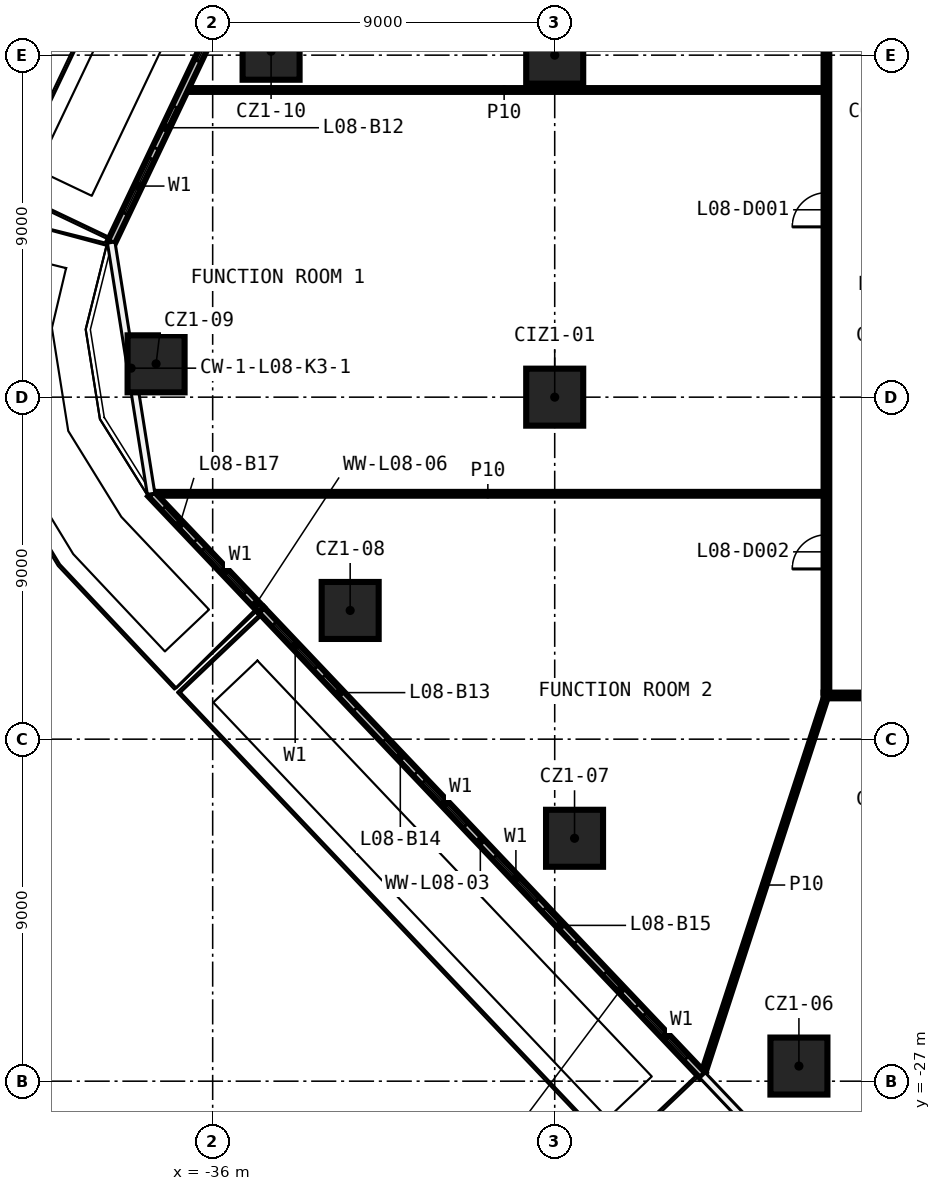
"""IFC4 building model, lengths in metres.
Left out: names, types, materials, properties, quantities, classifications, styles, units other than length and angle.
Written with IfcOpenShell. Run it as: python <this file> out.ifc"""

import sys

from ifc_helpers import new_model, si_unit, direction, frame, frame_2d, origin, origin_2d, place, context, subcontext, project, spatial, rectangle, extrude, element, fill, save


model = new_model("IFC4")
c1 = context("Model", 3, precision=1e-05, world=origin(), true_north=direction((0.0, 1.0)))
c2 = subcontext(c1, "Body", "Model", "MODEL_VIEW")
j1 = project(units=[si_unit("LENGTHUNIT", "METRE"), si_unit("PLANEANGLEUNIT", "RADIAN")], contexts=[c1])
p1 = place(None, origin())
s1 = spatial("IfcSite", under=j1, at=p1, CompositionType="ELEMENT")
p2 = place(p1, origin())
s2 = spatial("IfcBuilding", under=s1, at=p2, CompositionType="ELEMENT")
p3 = place(p2, frame((0.0, 0.0, 51.4)))
s3 = spatial("IfcBuildingStorey", under=s2, at=p3, CompositionType="ELEMENT", Elevation=51.4)
for number, where, z_axis, x_axis in (
    (1, (-20.574, -26.602, 0.0), (0.0, 0.0, 1.0), (1.0, 0.0, 0.0)),
    (2, (-26.478, -20.608, 0.0), (0.0, 0.0, 1.0), (1.0, 0.0, 0.0)),
    (3, (-32.382, -14.613, 0.0), (0.0, 0.0, 1.0), (1.0, 0.0, 0.0)),
    (4, (-37.489, -8.123, 0.0), (0.0, 0.0, 1.0), (1.0, 0.0, 0.0)),
    (5, (-34.463, 0.103, 0.0), (0.0, 0.0, 1.0), (1.0, 0.0, 0.0)),
    (6, (-27.0, -9.0, 0.0), (0.0, 0.0, 1.0), (1.0, 0.0, 0.0)),
    (7, (-27.0, 0.0, 0.0), (0.0, 0.0, 1.0), (1.0, 0.0, 0.0)),
):
    element("IfcColumn", number, at=place(p3, frame(where, z_axis=z_axis, x_axis=x_axis)), inside=s3, PredefinedType="COLUMN", context=c2, shape_type="SweptSolid", body=[
        extrude(rectangle(XDim=1.5, YDim=1.5, at=origin_2d()), origin(), (0.0, 0.0, 1.0), 3.3),
    ])
p4 = place(p3, frame((19.925, -16.85, 0.0), z_axis=(0.0, 0.0, 1.0), x_axis=(-1.0, 0.0, 0.0)))
e8 = element("IfcWall", 8, at=p4, inside=s3, PredefinedType="PARTITIONING", context=c2, shape_type="SweptSolid", body=[
    extrude(rectangle(XDim=39.85, YDim=0.15, at=frame_2d((19.925, 0.0))), origin(), (0.0, 0.0, 1.0), 3.3),
])
p5 = place(p4, frame((31.008, 0.0, 0.0)))
e9 = element("IfcOpeningElement", 9, at=p5, cuts=e8, PredefinedType="OPENING", context=c2, shape_type="SweptSolid", body=[
    extrude(rectangle(XDim=0.9, YDim=2.1, at=frame_2d((0.45, 1.05))), frame((0.0, 0.085, 0.0), z_axis=(0.0, -1.0, 0.0), x_axis=(1.0, 0.0, 0.0)), (0.0, 0.0, 1.0), 0.17),
])
p6 = place(p4, frame((22.704, 0.0, 0.0)))
e10 = element("IfcOpeningElement", 10, at=p6, cuts=e8, PredefinedType="OPENING", context=c2, shape_type="SweptSolid", body=[
    extrude(rectangle(XDim=0.9, YDim=2.1, at=frame_2d((0.45, 1.05))), frame((0.0, 0.085, 0.0), z_axis=(0.0, -1.0, 0.0), x_axis=(1.0, 0.0, 0.0)), (0.0, 0.0, 1.0), 0.17),
])
p7 = place(p4, frame((3.888, 0.0, 0.0)))
e11 = element("IfcOpeningElement", 11, at=p7, cuts=e8, PredefinedType="OPENING", context=c2, shape_type="SweptSolid", body=[
    extrude(rectangle(XDim=0.9, YDim=2.1, at=frame_2d((0.45, 1.05))), frame((0.0, 0.085, 0.0), z_axis=(0.0, -1.0, 0.0), x_axis=(1.0, 0.0, 0.0)), (0.0, 0.0, 1.0), 0.17),
])
p8 = place(p3, frame((-37.594, -11.543, 0.0), z_axis=(0.0, 0.0, 1.0), x_axis=(1.0, 0.0, 0.0)))
e12 = element("IfcWall", 12, at=p8, inside=s3, PredefinedType="PARTITIONING", context=c2, shape_type="SweptSolid", body=[
    extrude(rectangle(XDim=17.668, YDim=0.1, at=frame_2d((8.834, 0.0))), origin(), (0.0, 0.0, 1.0), 3.3),
])
p9 = place(p3, frame((-36.737, -0.917, 0.0), z_axis=(0.0, 0.0, 1.0), x_axis=(1.0, 0.0, 0.0)))
e13 = element("IfcWall", 13, at=p9, inside=s3, PredefinedType="PARTITIONING", context=c2, shape_type="SweptSolid", body=[
    extrude(rectangle(XDim=16.812, YDim=0.1, at=frame_2d((8.406, 0.0))), origin(), (0.0, 0.0, 1.0), 3.3),
])
p10 = place(p3, frame((-23.101, -26.826, 0.0), z_axis=(0.0, 0.0, 1.0), x_axis=(0.309854630824, 0.950783943784, 0.0)))
e14 = element("IfcWall", 14, at=p10, inside=s3, PredefinedType="PARTITIONING", context=c2, shape_type="SweptSolid", body=[
    extrude(rectangle(XDim=10.493, YDim=0.1, at=frame_2d((5.246, 0.0))), origin(), (0.0, 0.0, 1.0), 3.3),
])
p11 = place(p3, frame((-19.85, -16.775, 0.0), z_axis=(0.0, 0.0, 1.0), x_axis=(0.0, 1.0, 0.0)))
e15 = element("IfcWall", 15, at=p11, inside=s3, PredefinedType="PARTITIONING", context=c2, shape_type="SweptSolid", body=[
    extrude(rectangle(XDim=33.55, YDim=0.15, at=frame_2d((16.775, 0.0))), origin(), (0.0, 0.0, 1.0), 3.3),
])
p12 = place(p11, frame((12.256, 0.0, 0.0)))
e16 = element("IfcOpeningElement", 16, at=p12, cuts=e15, PredefinedType="OPENING", context=c2, shape_type="SweptSolid", body=[
    extrude(rectangle(XDim=0.9, YDim=2.1, at=frame_2d((0.45, 1.05))), frame((0.0, 0.085, 0.0), z_axis=(0.0, -1.0, 0.0), x_axis=(1.0, 0.0, 0.0)), (0.0, 0.0, 1.0), 0.17),
])
p13 = place(p11, frame((3.254, 0.0, 0.0)))
e17 = element("IfcOpeningElement", 17, at=p13, cuts=e15, PredefinedType="OPENING", context=c2, shape_type="SweptSolid", body=[
    extrude(rectangle(XDim=0.9, YDim=2.1, at=frame_2d((0.45, 1.05))), frame((0.0, 0.085, 0.0), z_axis=(0.0, -1.0, 0.0), x_axis=(1.0, 0.0, 0.0)), (0.0, 0.0, 1.0), 0.17),
])
p14 = place(p11, frame((27.451, 0.0, 0.0)))
e18 = element("IfcOpeningElement", 18, at=p14, cuts=e15, PredefinedType="OPENING", context=c2, shape_type="SweptSolid", body=[
    extrude(rectangle(XDim=0.9, YDim=2.1, at=frame_2d((0.45, 1.05))), frame((0.0, 0.085, 0.0), z_axis=(0.0, -1.0, 0.0), x_axis=(1.0, 0.0, 0.0)), (0.0, 0.0, 1.0), 0.17),
])
p15 = place(p3, frame((-25.295, 23.168, 0.0), z_axis=(0.0, 0.0, 1.0), x_axis=(-0.429791665344, -0.902928083737, 0.0)))
e19 = element("IfcWall", 19, at=p15, inside=s3, PredefinedType="SOLIDWALL", context=c2, shape_type="SweptSolid", body=[
    extrude(rectangle(XDim=31.12, YDim=0.2, at=frame_2d((15.56, 0.0))), origin(), (0.0, 0.0, 1.0), 3.3),
])
p16 = place(p15, frame((2.0, 0.0, 0.6)))
e20 = element("IfcOpeningElement", 20, at=p16, cuts=e19, PredefinedType="OPENING", context=c2, shape_type="SweptSolid", body=[
    extrude(rectangle(XDim=1.6, YDim=2.4, at=frame_2d((0.8, 1.2))), frame((0.0, 0.11, 0.0), z_axis=(0.0, -1.0, 0.0), x_axis=(1.0, 0.0, 0.0)), (0.0, 0.0, 1.0), 0.22),
])
p17 = place(p15, frame((0.5, 0.0, 0.0)))
e21 = element("IfcOpeningElement", 21, at=p17, cuts=e19, PredefinedType="OPENING", context=c2, shape_type="SweptSolid", body=[
    extrude(rectangle(XDim=1.2, YDim=2.4, at=frame_2d((0.6, 1.2))), frame((0.0, 0.11, 0.0), z_axis=(0.0, -1.0, 0.0), x_axis=(1.0, 0.0, 0.0)), (0.0, 0.0, 1.0), 0.22),
])
p18 = place(p15, frame((6.446, 0.0, 0.6)))
e22 = element("IfcOpeningElement", 22, at=p18, cuts=e19, PredefinedType="OPENING", context=c2, shape_type="SweptSolid", body=[
    extrude(rectangle(XDim=1.6, YDim=2.4, at=frame_2d((0.8, 1.2))), frame((0.0, 0.11, 0.0), z_axis=(0.0, -1.0, 0.0), x_axis=(1.0, 0.0, 0.0)), (0.0, 0.0, 1.0), 0.22),
])
p19 = place(p15, frame((4.946, 0.0, 0.0)))
e23 = element("IfcOpeningElement", 23, at=p19, cuts=e19, PredefinedType="OPENING", context=c2, shape_type="SweptSolid", body=[
    extrude(rectangle(XDim=1.2, YDim=2.4, at=frame_2d((0.6, 1.2))), frame((0.0, 0.11, 0.0), z_axis=(0.0, -1.0, 0.0), x_axis=(1.0, 0.0, 0.0)), (0.0, 0.0, 1.0), 0.22),
])
p20 = place(p15, frame((10.891, 0.0, 0.6)))
e24 = element("IfcOpeningElement", 24, at=p20, cuts=e19, PredefinedType="OPENING", context=c2, shape_type="SweptSolid", body=[
    extrude(rectangle(XDim=1.6, YDim=2.4, at=frame_2d((0.8, 1.2))), frame((0.0, 0.11, 0.0), z_axis=(0.0, -1.0, 0.0), x_axis=(1.0, 0.0, 0.0)), (0.0, 0.0, 1.0), 0.22),
])
p21 = place(p15, frame((9.391, 0.0, 0.0)))
e25 = element("IfcOpeningElement", 25, at=p21, cuts=e19, PredefinedType="OPENING", context=c2, shape_type="SweptSolid", body=[
    extrude(rectangle(XDim=1.2, YDim=2.4, at=frame_2d((0.6, 1.2))), frame((0.0, 0.11, 0.0), z_axis=(0.0, -1.0, 0.0), x_axis=(1.0, 0.0, 0.0)), (0.0, 0.0, 1.0), 0.22),
])
p22 = place(p15, frame((15.337, 0.0, 0.6)))
e26 = element("IfcOpeningElement", 26, at=p22, cuts=e19, PredefinedType="OPENING", context=c2, shape_type="SweptSolid", body=[
    extrude(rectangle(XDim=1.6, YDim=2.4, at=frame_2d((0.8, 1.2))), frame((0.0, 0.11, 0.0), z_axis=(0.0, -1.0, 0.0), x_axis=(1.0, 0.0, 0.0)), (0.0, 0.0, 1.0), 0.22),
])
p23 = place(p15, frame((13.837, 0.0, 0.0)))
e27 = element("IfcOpeningElement", 27, at=p23, cuts=e19, PredefinedType="OPENING", context=c2, shape_type="SweptSolid", body=[
    extrude(rectangle(XDim=1.2, YDim=2.4, at=frame_2d((0.6, 1.2))), frame((0.0, 0.11, 0.0), z_axis=(0.0, -1.0, 0.0), x_axis=(1.0, 0.0, 0.0)), (0.0, 0.0, 1.0), 0.22),
])
p24 = place(p15, frame((19.783, 0.0, 0.6)))
e28 = element("IfcOpeningElement", 28, at=p24, cuts=e19, PredefinedType="OPENING", context=c2, shape_type="SweptSolid", body=[
    extrude(rectangle(XDim=1.6, YDim=2.4, at=frame_2d((0.8, 1.2))), frame((0.0, 0.11, 0.0), z_axis=(0.0, -1.0, 0.0), x_axis=(1.0, 0.0, 0.0)), (0.0, 0.0, 1.0), 0.22),
])
p25 = place(p15, frame((18.283, 0.0, 0.0)))
e29 = element("IfcOpeningElement", 29, at=p25, cuts=e19, PredefinedType="OPENING", context=c2, shape_type="SweptSolid", body=[
    extrude(rectangle(XDim=1.2, YDim=2.4, at=frame_2d((0.6, 1.2))), frame((0.0, 0.11, 0.0), z_axis=(0.0, -1.0, 0.0), x_axis=(1.0, 0.0, 0.0)), (0.0, 0.0, 1.0), 0.22),
])
p26 = place(p15, frame((24.229, 0.0, 0.6)))
e30 = element("IfcOpeningElement", 30, at=p26, cuts=e19, PredefinedType="OPENING", context=c2, shape_type="SweptSolid", body=[
    extrude(rectangle(XDim=1.6, YDim=2.4, at=frame_2d((0.8, 1.2))), frame((0.0, 0.11, 0.0), z_axis=(0.0, -1.0, 0.0), x_axis=(1.0, 0.0, 0.0)), (0.0, 0.0, 1.0), 0.22),
])
p27 = place(p15, frame((22.729, 0.0, 0.0)))
e31 = element("IfcOpeningElement", 31, at=p27, cuts=e19, PredefinedType="OPENING", context=c2, shape_type="SweptSolid", body=[
    extrude(rectangle(XDim=1.2, YDim=2.4, at=frame_2d((0.6, 1.2))), frame((0.0, 0.11, 0.0), z_axis=(0.0, -1.0, 0.0), x_axis=(1.0, 0.0, 0.0)), (0.0, 0.0, 1.0), 0.22),
])
p28 = place(p15, frame((28.674, 0.0, 0.6)))
e32 = element("IfcOpeningElement", 32, at=p28, cuts=e19, PredefinedType="OPENING", context=c2, shape_type="SweptSolid", body=[
    extrude(rectangle(XDim=1.6, YDim=2.4, at=frame_2d((0.8, 1.2))), frame((0.0, 0.11, 0.0), z_axis=(0.0, -1.0, 0.0), x_axis=(1.0, 0.0, 0.0)), (0.0, 0.0, 1.0), 0.22),
])
p29 = place(p15, frame((27.174, 0.0, 0.0)))
e33 = element("IfcOpeningElement", 33, at=p29, cuts=e19, PredefinedType="OPENING", context=c2, shape_type="SweptSolid", body=[
    extrude(rectangle(XDim=1.2, YDim=2.4, at=frame_2d((0.6, 1.2))), frame((0.0, 0.11, 0.0), z_axis=(0.0, -1.0, 0.0), x_axis=(1.0, 0.0, 0.0)), (0.0, 0.0, 1.0), 0.22),
])
p30 = place(p3, frame((-34.724, -14.598, 0.0), z_axis=(0.0, 0.0, 1.0), x_axis=(0.688093946104, -0.725621610301, 0.0)))
e34 = element("IfcWall", 34, at=p30, inside=s3, PredefinedType="SOLIDWALL", context=c2, shape_type="SweptSolid", body=[
    extrude(rectangle(XDim=16.882, YDim=0.2, at=frame_2d((8.441, 0.0))), origin(), (0.0, 0.0, 1.0), 3.3),
])
p31 = place(p30, frame((0.5, 0.0, 0.6)))
e35 = element("IfcOpeningElement", 35, at=p31, cuts=e34, PredefinedType="OPENING", context=c2, shape_type="SweptSolid", body=[
    extrude(rectangle(XDim=1.6, YDim=2.4, at=frame_2d((0.8, 1.2))), frame((0.0, 0.11, 0.0), z_axis=(0.0, -1.0, 0.0), x_axis=(1.0, 0.0, 0.0)), (0.0, 0.0, 1.0), 0.22),
])
p32 = place(p30, frame((2.4, 0.0, 0.0)))
e36 = element("IfcOpeningElement", 36, at=p32, cuts=e34, PredefinedType="OPENING", context=c2, shape_type="SweptSolid", body=[
    extrude(rectangle(XDim=1.2, YDim=2.4, at=frame_2d((0.6, 1.2))), frame((0.0, 0.11, 0.0), z_axis=(0.0, -1.0, 0.0), x_axis=(1.0, 0.0, 0.0)), (0.0, 0.0, 1.0), 0.22),
])
p33 = place(p30, frame((6.22, 0.0, 0.6)))
e37 = element("IfcOpeningElement", 37, at=p33, cuts=e34, PredefinedType="OPENING", context=c2, shape_type="SweptSolid", body=[
    extrude(rectangle(XDim=1.6, YDim=2.4, at=frame_2d((0.8, 1.2))), frame((0.0, 0.11, 0.0), z_axis=(0.0, -1.0, 0.0), x_axis=(1.0, 0.0, 0.0)), (0.0, 0.0, 1.0), 0.22),
])
p34 = place(p30, frame((4.72, 0.0, 0.0)))
e38 = element("IfcOpeningElement", 38, at=p34, cuts=e34, PredefinedType="OPENING", context=c2, shape_type="SweptSolid", body=[
    extrude(rectangle(XDim=1.2, YDim=2.4, at=frame_2d((0.6, 1.2))), frame((0.0, 0.11, 0.0), z_axis=(0.0, -1.0, 0.0), x_axis=(1.0, 0.0, 0.0)), (0.0, 0.0, 1.0), 0.22),
])
p35 = place(p30, frame((8.941, 0.0, 0.6)))
e39 = element("IfcOpeningElement", 39, at=p35, cuts=e34, PredefinedType="OPENING", context=c2, shape_type="SweptSolid", body=[
    extrude(rectangle(XDim=1.6, YDim=2.4, at=frame_2d((0.8, 1.2))), frame((0.0, 0.11, 0.0), z_axis=(0.0, -1.0, 0.0), x_axis=(1.0, 0.0, 0.0)), (0.0, 0.0, 1.0), 0.22),
])
p36 = place(p30, frame((10.841, 0.0, 0.0)))
e40 = element("IfcOpeningElement", 40, at=p36, cuts=e34, PredefinedType="OPENING", context=c2, shape_type="SweptSolid", body=[
    extrude(rectangle(XDim=1.2, YDim=2.4, at=frame_2d((0.6, 1.2))), frame((0.0, 0.11, 0.0), z_axis=(0.0, -1.0, 0.0), x_axis=(1.0, 0.0, 0.0)), (0.0, 0.0, 1.0), 0.22),
])
p37 = place(p30, frame((14.662, 0.0, 0.6)))
e41 = element("IfcOpeningElement", 41, at=p37, cuts=e34, PredefinedType="OPENING", context=c2, shape_type="SweptSolid", body=[
    extrude(rectangle(XDim=1.6, YDim=2.4, at=frame_2d((0.8, 1.2))), frame((0.0, 0.11, 0.0), z_axis=(0.0, -1.0, 0.0), x_axis=(1.0, 0.0, 0.0)), (0.0, 0.0, 1.0), 0.22),
])
p38 = place(p30, frame((13.162, 0.0, 0.0)))
e42 = element("IfcOpeningElement", 42, at=p38, cuts=e34, PredefinedType="OPENING", context=c2, shape_type="SweptSolid", body=[
    extrude(rectangle(XDim=1.2, YDim=2.4, at=frame_2d((0.6, 1.2))), frame((0.0, 0.11, 0.0), z_axis=(0.0, -1.0, 0.0), x_axis=(1.0, 0.0, 0.0)), (0.0, 0.0, 1.0), 0.22),
])
p39 = place(p3, frame((-37.621, -11.543, 0.0), z_axis=(0.0, 0.0, 1.0), x_axis=(0.688100005166, -0.725615864553, 0.0)))
e43 = element("IfcWall", 43, at=p39, inside=s3, PredefinedType="SOLIDWALL", context=c2, shape_type="SweptSolid", body=[
    extrude(rectangle(XDim=4.21, YDim=0.2, at=frame_2d((2.105, 0.0))), origin(), (0.0, 0.0, 1.0), 3.3),
])
p40 = place(p39, frame((2.0, 0.0, 0.6)))
e44 = element("IfcOpeningElement", 44, at=p40, cuts=e43, PredefinedType="OPENING", context=c2, shape_type="SweptSolid", body=[
    extrude(rectangle(XDim=1.6, YDim=2.4, at=frame_2d((0.8, 1.2))), frame((0.0, 0.11, 0.0), z_axis=(0.0, -1.0, 0.0), x_axis=(1.0, 0.0, 0.0)), (0.0, 0.0, 1.0), 0.22),
])
p41 = place(p39, frame((0.5, 0.0, 0.0)))
e45 = element("IfcOpeningElement", 45, at=p41, cuts=e43, PredefinedType="OPENING", context=c2, shape_type="SweptSolid", body=[
    extrude(rectangle(XDim=1.2, YDim=2.4, at=frame_2d((0.6, 1.2))), frame((0.0, 0.11, 0.0), z_axis=(0.0, -1.0, 0.0), x_axis=(1.0, 0.0, 0.0)), (0.0, 0.0, 1.0), 0.22),
])
p42 = place(p12, origin())
e46 = element("IfcDoor", 46, at=p42, inside=s3, OperationType="SINGLE_SWING_RIGHT", PredefinedType="DOOR", context=c2, shape_type="SweptSolid", body=[
    extrude(rectangle(XDim=0.9, YDim=2.1, at=frame_2d((0.45, 1.05))), frame((0.0, 0.025, 0.0), z_axis=(0.0, -1.0, 0.0), x_axis=(1.0, 0.0, 0.0)), (0.0, 0.0, 1.0), 0.05),
])
fill(e16, e46)
p43 = place(p13, origin())
e47 = element("IfcDoor", 47, at=p43, inside=s3, OperationType="SINGLE_SWING_LEFT", PredefinedType="DOOR", context=c2, shape_type="SweptSolid", body=[
    extrude(rectangle(XDim=0.9, YDim=2.1, at=frame_2d((0.45, 1.05))), frame((0.0, 0.025, 0.0), z_axis=(0.0, -1.0, 0.0), x_axis=(1.0, 0.0, 0.0)), (0.0, 0.0, 1.0), 0.05),
])
fill(e17, e47)
p44 = place(p26, origin())
e48 = element("IfcWindow", 48, at=p44, inside=s3, PartitioningType="SINGLE_PANEL", PredefinedType="WINDOW", context=c2, shape_type="SweptSolid", body=[
    extrude(rectangle(XDim=1.6, YDim=2.4, at=frame_2d((0.8, 1.2))), frame((0.0, 0.03, 0.0), z_axis=(0.0, -1.0, 0.0), x_axis=(1.0, 0.0, 0.0)), (0.0, 0.0, 1.0), 0.06),
])
fill(e30, e48)
p45 = place(p28, origin())
e49 = element("IfcWindow", 49, at=p45, inside=s3, PartitioningType="SINGLE_PANEL", PredefinedType="WINDOW", context=c2, shape_type="SweptSolid", body=[
    extrude(rectangle(XDim=1.6, YDim=2.4, at=frame_2d((0.8, 1.2))), frame((0.0, 0.03, 0.0), z_axis=(0.0, -1.0, 0.0), x_axis=(1.0, 0.0, 0.0)), (0.0, 0.0, 1.0), 0.06),
])
fill(e32, e49)
p46 = place(p29, origin())
e50 = element("IfcDoor", 50, at=p46, inside=s3, OperationType="SLIDING_TO_LEFT", PredefinedType="DOOR", context=c2, shape_type="SweptSolid", body=[
    extrude(rectangle(XDim=1.2, YDim=2.4, at=frame_2d((0.6, 1.2))), frame((0.0, 0.025, 0.0), z_axis=(0.0, -1.0, 0.0), x_axis=(1.0, 0.0, 0.0)), (0.0, 0.0, 1.0), 0.05),
])
fill(e33, e50)
p47 = place(p31, origin())
e51 = element("IfcWindow", 51, at=p47, inside=s3, PartitioningType="SINGLE_PANEL", PredefinedType="WINDOW", context=c2, shape_type="SweptSolid", body=[
    extrude(rectangle(XDim=1.6, YDim=2.4, at=frame_2d((0.8, 1.2))), frame((0.0, 0.03, 0.0), z_axis=(0.0, -1.0, 0.0), x_axis=(1.0, 0.0, 0.0)), (0.0, 0.0, 1.0), 0.06),
])
fill(e35, e51)
p48 = place(p32, origin())
e52 = element("IfcDoor", 52, at=p48, inside=s3, OperationType="SLIDING_TO_LEFT", PredefinedType="DOOR", context=c2, shape_type="SweptSolid", body=[
    extrude(rectangle(XDim=1.2, YDim=2.4, at=frame_2d((0.6, 1.2))), frame((0.0, 0.025, 0.0), z_axis=(0.0, -1.0, 0.0), x_axis=(1.0, 0.0, 0.0)), (0.0, 0.0, 1.0), 0.05),
])
fill(e36, e52)
p49 = place(p33, origin())
e53 = element("IfcWindow", 53, at=p49, inside=s3, PartitioningType="SINGLE_PANEL", PredefinedType="WINDOW", context=c2, shape_type="SweptSolid", body=[
    extrude(rectangle(XDim=1.6, YDim=2.4, at=frame_2d((0.8, 1.2))), frame((0.0, 0.03, 0.0), z_axis=(0.0, -1.0, 0.0), x_axis=(1.0, 0.0, 0.0)), (0.0, 0.0, 1.0), 0.06),
])
fill(e37, e53)
p50 = place(p34, origin())
e54 = element("IfcDoor", 54, at=p50, inside=s3, OperationType="SLIDING_TO_LEFT", PredefinedType="DOOR", context=c2, shape_type="SweptSolid", body=[
    extrude(rectangle(XDim=1.2, YDim=2.4, at=frame_2d((0.6, 1.2))), frame((0.0, 0.025, 0.0), z_axis=(0.0, -1.0, 0.0), x_axis=(1.0, 0.0, 0.0)), (0.0, 0.0, 1.0), 0.05),
])
fill(e38, e54)
p51 = place(p35, origin())
e55 = element("IfcWindow", 55, at=p51, inside=s3, PartitioningType="SINGLE_PANEL", PredefinedType="WINDOW", context=c2, shape_type="SweptSolid", body=[
    extrude(rectangle(XDim=1.6, YDim=2.4, at=frame_2d((0.8, 1.2))), frame((0.0, 0.03, 0.0), z_axis=(0.0, -1.0, 0.0), x_axis=(1.0, 0.0, 0.0)), (0.0, 0.0, 1.0), 0.06),
])
fill(e39, e55)
p52 = place(p36, origin())
e56 = element("IfcDoor", 56, at=p52, inside=s3, OperationType="SLIDING_TO_LEFT", PredefinedType="DOOR", context=c2, shape_type="SweptSolid", body=[
    extrude(rectangle(XDim=1.2, YDim=2.4, at=frame_2d((0.6, 1.2))), frame((0.0, 0.025, 0.0), z_axis=(0.0, -1.0, 0.0), x_axis=(1.0, 0.0, 0.0)), (0.0, 0.0, 1.0), 0.05),
])
fill(e40, e56)
p53 = place(p37, origin())
e57 = element("IfcWindow", 57, at=p53, inside=s3, PartitioningType="SINGLE_PANEL", PredefinedType="WINDOW", context=c2, shape_type="SweptSolid", body=[
    extrude(rectangle(XDim=1.6, YDim=2.4, at=frame_2d((0.8, 1.2))), frame((0.0, 0.03, 0.0), z_axis=(0.0, -1.0, 0.0), x_axis=(1.0, 0.0, 0.0)), (0.0, 0.0, 1.0), 0.06),
])
fill(e41, e57)
p54 = place(p38, origin())
e58 = element("IfcDoor", 58, at=p54, inside=s3, OperationType="SLIDING_TO_LEFT", PredefinedType="DOOR", context=c2, shape_type="SweptSolid", body=[
    extrude(rectangle(XDim=1.2, YDim=2.4, at=frame_2d((0.6, 1.2))), frame((0.0, 0.025, 0.0), z_axis=(0.0, -1.0, 0.0), x_axis=(1.0, 0.0, 0.0)), (0.0, 0.0, 1.0), 0.05),
])
fill(e42, e58)
p55 = place(p40, origin())
e59 = element("IfcWindow", 59, at=p55, inside=s3, PartitioningType="SINGLE_PANEL", PredefinedType="WINDOW", context=c2, shape_type="SweptSolid", body=[
    extrude(rectangle(XDim=1.6, YDim=2.4, at=frame_2d((0.8, 1.2))), frame((0.0, 0.03, 0.0), z_axis=(0.0, -1.0, 0.0), x_axis=(1.0, 0.0, 0.0)), (0.0, 0.0, 1.0), 0.06),
])
fill(e44, e59)
p56 = place(p41, origin())
e60 = element("IfcDoor", 60, at=p56, inside=s3, OperationType="SLIDING_TO_LEFT", PredefinedType="DOOR", context=c2, shape_type="SweptSolid", body=[
    extrude(rectangle(XDim=1.2, YDim=2.4, at=frame_2d((0.6, 1.2))), frame((0.0, 0.025, 0.0), z_axis=(0.0, -1.0, 0.0), x_axis=(1.0, 0.0, 0.0)), (0.0, 0.0, 1.0), 0.05),
])
fill(e45, e60)
save(model, sys.argv[1])
